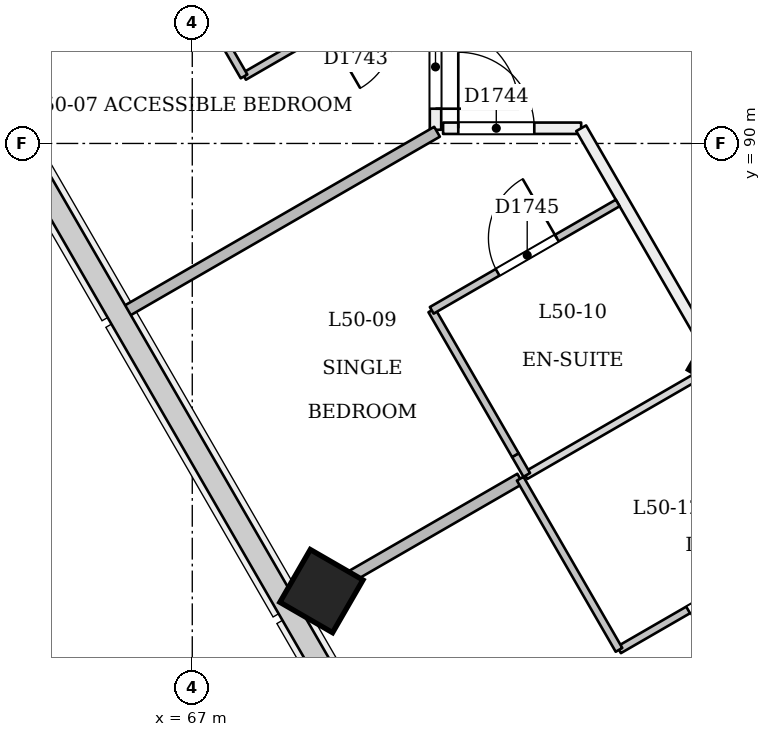
"""IFC4 building model, lengths in metres.
Left out: names, types, materials, properties, quantities, classifications, styles, units other than length and angle.
Written with IfcOpenShell. Run it as: python <this file> out.ifc"""

import sys

from ifc_helpers import new_model, si_unit, direction, frame, frame_2d, origin, origin_2d, place, context, subcontext, project, spatial, rectangle, extrude, element, fill, save


model = new_model("IFC4")
c1 = context("Model", 3, precision=1e-05, world=origin(), true_north=direction((0.0, 1.0)))
c2 = subcontext(c1, "Body", "Model", "MODEL_VIEW")
j1 = project(units=[si_unit("LENGTHUNIT", "METRE"), si_unit("PLANEANGLEUNIT", "RADIAN")], contexts=[c1])
p1 = place(None, origin())
s1 = spatial("IfcSite", under=j1, at=p1, CompositionType="ELEMENT")
p2 = place(p1, origin())
s2 = spatial("IfcBuilding", under=s1, at=p2, CompositionType="ELEMENT")
p3 = place(p2, frame((0.0, 0.0, 194.4)))
s3 = spatial("IfcBuildingStorey", under=s2, at=p3, CompositionType="ELEMENT", Elevation=194.4)
p4 = place(p3, frame((73.912, 87.089, -0.018), z_axis=(0.02215519141, 0.038415882353, 0.999016199807), x_axis=(-0.865361930339, -0.499673644695, 0.03840544644)))
e1 = element("IfcColumn", 1, at=p4, inside=s3, PredefinedType="COLUMN", context=c2, shape_type="SweptSolid", body=[
    extrude(rectangle(XDim=0.6, YDim=0.6, at=origin_2d()), origin(), (0.0, 0.0, 1.0), 3.604),
])
p5 = place(p3, frame((68.673, 84.064, 0.0), z_axis=(0.022235136645, 0.038468150514, 0.999012412383), x_axis=(-0.865845034967, -0.498830353482, 0.038479265431)))
e2 = element("IfcColumn", 2, at=p5, inside=s3, PredefinedType="COLUMN", context=c2, shape_type="SweptSolid", body=[
    extrude(rectangle(XDim=0.8, YDim=0.8, at=origin_2d()), origin(), (0.0, 0.0, 1.0), 3.579),
])
p6 = place(p3, frame((70.2, 93.519, 0.0), z_axis=(0.0, 0.0, 1.0), x_axis=(0.0, -1.0, 0.0)))
e3 = element("IfcWall", 3, at=p6, inside=s3, PredefinedType="PARTITIONING", context=c2, shape_type="SweptSolid", body=[
    extrude(rectangle(XDim=3.339, YDim=0.15, at=frame_2d((1.669, 0.0))), origin(), (0.0, 0.0, 1.0), 3.15),
])
p7 = place(p6, frame((1.962, 0.0, 0.0)))
e4 = element("IfcOpeningElement", 4, at=p7, cuts=e3, PredefinedType="OPENING", context=c2, shape_type="SweptSolid", body=[
    extrude(rectangle(XDim=1.1, YDim=2.1, at=frame_2d((0.55, 1.05))), frame((0.0, 0.085, 0.0), z_axis=(0.0, -1.0, 0.0), x_axis=(1.0, 0.0, 0.0)), (0.0, 0.0, 1.0), 0.171),
])
p8 = place(p3, frame((70.3, 90.2, 0.0), z_axis=(0.0, 0.0, 1.0), x_axis=(1.0, 0.0, 0.0)))
e5 = element("IfcWall", 5, at=p8, inside=s3, PredefinedType="PARTITIONING", context=c2, shape_type="SweptSolid", body=[
    extrude(rectangle(XDim=1.817, YDim=0.15, at=frame_2d((0.908, 0.0))), origin(), (0.0, 0.0, 1.0), 3.15),
])
p9 = place(p8, frame((0.2, 0.0, 0.0)))
e6 = element("IfcOpeningElement", 6, at=p9, cuts=e5, PredefinedType="OPENING", context=c2, shape_type="SweptSolid", body=[
    extrude(rectangle(XDim=1.0, YDim=2.1, at=frame_2d((0.5, 1.05))), frame((0.0, 0.085, 0.0), z_axis=(0.0, -1.0, 0.0), x_axis=(1.0, 0.0, 0.0)), (0.0, 0.0, 1.0), 0.171),
])
p10 = place(p3, frame((72.116, 90.2, 0.0), z_axis=(0.0, 0.0, 1.0), x_axis=(0.500004369671, -0.866022880939, 0.0)))
e7 = element("IfcWall", 7, at=p10, inside=s3, PredefinedType="PARTITIONING", context=c2, shape_type="SweptSolid", body=[
    extrude(rectangle(XDim=25.637, YDim=0.15, at=frame_2d((12.819, 0.0))), origin(), (0.0, 0.0, 1.0), 2.75),
])
p11 = place(p10, frame((6.487, 0.0, 0.0)))
e8 = element("IfcOpeningElement", 8, at=p11, cuts=e7, PredefinedType="OPENING", context=c2, shape_type="SweptSolid", body=[
    extrude(rectangle(XDim=1.0, YDim=2.1, at=frame_2d((0.5, 1.05))), frame((0.0, 0.085, 0.0), z_axis=(0.0, -1.0, 0.0), x_axis=(1.0, 0.0, 0.0)), (0.0, 0.0, 1.0), 0.171),
])
p12 = place(p10, frame((10.992, 0.0, 0.0)))
e9 = element("IfcOpeningElement", 9, at=p12, cuts=e7, PredefinedType="OPENING", context=c2, shape_type="SweptSolid", body=[
    extrude(rectangle(XDim=1.2, YDim=2.1, at=frame_2d((0.6, 1.05))), frame((0.0, 0.085, 0.0), z_axis=(0.0, -1.0, 0.0), x_axis=(1.0, 0.0, 0.0)), (0.0, 0.0, 1.0), 0.171),
])
p13 = place(p10, frame((19.987, 0.0, 0.0)))
e10 = element("IfcOpeningElement", 10, at=p13, cuts=e7, PredefinedType="OPENING", context=c2, shape_type="SweptSolid", body=[
    extrude(rectangle(XDim=1.0, YDim=2.1, at=frame_2d((0.5, 1.05))), frame((0.0, 0.085, 0.0), z_axis=(0.0, -1.0, 0.0), x_axis=(1.0, 0.0, 0.0)), (0.0, 0.0, 1.0), 0.171),
])
p14 = place(p10, frame((23.97, 0.0, 0.0)))
e11 = element("IfcOpeningElement", 11, at=p14, cuts=e7, PredefinedType="OPENING", context=c2, shape_type="SweptSolid", body=[
    extrude(rectangle(XDim=1.2, YDim=2.1, at=frame_2d((0.6, 1.05))), frame((0.0, 0.085, 0.0), z_axis=(0.0, -1.0, 0.0), x_axis=(1.0, 0.0, 0.0)), (0.0, 0.0, 1.0), 0.171),
])
p15 = place(p3, frame((70.1, 92.279, 0.0), z_axis=(0.0, 0.0, 1.0), x_axis=(-0.866040030748, -0.499974664501, 0.0)))
e12 = element("IfcWall", 12, at=p15, inside=s3, PredefinedType="PARTITIONING", context=c2, shape_type="SweptSolid", body=[
    extrude(rectangle(XDim=2.793, YDim=0.1, at=frame_2d((1.396, 0.0))), origin(), (0.0, 0.0, 1.0), 3.15),
])
p16 = place(p15, frame((0.647, 0.0, 0.0)))
e13 = element("IfcOpeningElement", 13, at=p16, cuts=e12, PredefinedType="OPENING", context=c2, shape_type="SweptSolid", body=[
    extrude(rectangle(XDim=0.9, YDim=2.1, at=frame_2d((0.45, 1.05))), frame((0.0, 0.061, 0.0), z_axis=(0.0, -1.0, 0.0), x_axis=(1.0, 0.0, 0.0)), (0.0, 0.0, 1.0), 0.121),
])
p17 = place(p3, frame((67.681, 90.882, 0.0), z_axis=(0.0, 0.0, 1.0), x_axis=(-0.500062241894, 0.865989465428, 0.0)))
e14 = element("IfcWall", 14, at=p17, inside=s3, PredefinedType="PARTITIONING", context=c2, shape_type="SweptSolid", body=[
    extrude(rectangle(XDim=2.55, YDim=0.1, at=frame_2d((1.275, 0.0))), origin(), (0.0, 0.0, 1.0), 3.15),
])
p18 = place(p3, frame((66.102, 87.777, 0.0), z_axis=(0.0, 0.0, 1.0), x_axis=(0.866029116435, 0.499993569446, 0.0)))
e15 = element("IfcWall", 15, at=p18, inside=s3, PredefinedType="PARTITIONING", context=c2, shape_type="SweptSolid", body=[
    extrude(rectangle(XDim=4.755, YDim=0.15, at=frame_2d((2.377, 0.0))), origin(), (0.0, 0.0, 1.0), 2.65),
])
p19 = place(p3, frame((71.401, 85.639, 0.0), z_axis=(0.0, 0.0, 1.0), x_axis=(-0.499464218792, 0.866334516308, 0.0)))
e16 = element("IfcWall", 16, at=p19, inside=s3, PredefinedType="PARTITIONING", context=c2, shape_type="SweptSolid", body=[
    extrude(rectangle(XDim=0.3, YDim=0.1, at=frame_2d((0.15, 0.0))), origin(), (0.0, 0.0, 1.0), 2.75),
])
p20 = place(p3, frame((71.251, 85.899, 0.0), z_axis=(0.0, 0.0, 1.0), x_axis=(-0.50002983664, 0.866008176907, 0.0)))
e17 = element("IfcWall", 17, at=p20, inside=s3, PredefinedType="PARTITIONING", context=c2, shape_type="SweptSolid", body=[
    extrude(rectangle(XDim=2.2, YDim=0.1, at=frame_2d((1.1, 0.0))), origin(), (0.0, 0.0, 1.0), 3.15),
])
p21 = place(p3, frame((70.151, 87.805, 0.0), z_axis=(0.0, 0.0, 1.0), x_axis=(0.866048868473, 0.499959355765, 0.0)))
e18 = element("IfcWall", 18, at=p21, inside=s3, PredefinedType="PARTITIONING", context=c2, shape_type="SweptSolid", body=[
    extrude(rectangle(XDim=2.825, YDim=0.1, at=frame_2d((1.413, 0.0))), origin(), (0.0, 0.0, 1.0), 3.15),
])
p22 = place(p21, frame((1.0, 0.0, 0.0)))
e19 = element("IfcOpeningElement", 19, at=p22, cuts=e18, PredefinedType="OPENING", context=c2, shape_type="SweptSolid", body=[
    extrude(rectangle(XDim=0.9, YDim=2.1, at=frame_2d((0.45, 1.05))), frame((0.0, 0.061, 0.0), z_axis=(0.0, -1.0, 0.0), x_axis=(1.0, 0.0, 0.0)), (0.0, 0.0, 1.0), 0.121),
])
p23 = place(p3, frame((68.37, 83.889, 0.0), z_axis=(0.0, 0.0, 1.0), x_axis=(0.865989465428, 0.500062241894, 0.0)))
e20 = element("IfcWall", 20, at=p23, inside=s3, PredefinedType="PARTITIONING", context=c2, shape_type="SweptSolid", body=[
    extrude(rectangle(XDim=3.4, YDim=0.15, at=frame_2d((1.7, 0.0))), origin(), (0.0, 0.0, 1.0), 2.65),
])
p24 = place(p3, frame((71.383, 85.629, 0.0), z_axis=(0.0, 0.0, 1.0), x_axis=(0.866011243319, 0.500024525844, 0.0)))
e21 = element("IfcWall", 21, at=p24, inside=s3, PredefinedType="PARTITIONING", context=c2, shape_type="SweptSolid", body=[
    extrude(rectangle(XDim=2.845, YDim=0.1, at=frame_2d((1.422, 0.0))), origin(), (0.0, 0.0, 1.0), 2.75),
])
p25 = place(p3, frame((75.147, 84.8, 0.0), z_axis=(0.0, 0.0, 1.0), x_axis=(-0.866046596414, -0.499963291492, 0.0)))
e22 = element("IfcWall", 22, at=p25, inside=s3, PredefinedType="PARTITIONING", context=c2, shape_type="SweptSolid", body=[
    extrude(rectangle(XDim=2.925, YDim=0.1, at=frame_2d((1.462, 0.0))), origin(), (0.0, 0.0, 1.0), 3.15),
])
p26 = place(p25, frame((0.975, 0.0, 0.0)))
e23 = element("IfcOpeningElement", 23, at=p26, cuts=e22, PredefinedType="OPENING", context=c2, shape_type="SweptSolid", body=[
    extrude(rectangle(XDim=0.9, YDim=2.1, at=frame_2d((0.45, 1.05))), frame((0.0, 0.061, 0.0), z_axis=(0.0, -1.0, 0.0), x_axis=(1.0, 0.0, 0.0)), (0.0, 0.0, 1.0), 0.121),
])
p27 = place(p3, frame((72.614, 83.338, 0.0), z_axis=(0.0, 0.0, 1.0), x_axis=(-0.500006934395, 0.866021400173, 0.0)))
e24 = element("IfcWall", 24, at=p27, inside=s3, PredefinedType="PARTITIONING", context=c2, shape_type="SweptSolid", body=[
    extrude(rectangle(XDim=2.6, YDim=0.1, at=frame_2d((1.3, 0.0))), origin(), (0.0, 0.0, 1.0), 2.75),
])
p28 = place(p7, origin())
e25 = element("IfcDoor", 25, at=p28, inside=s3, OperationType="SINGLE_SWING_RIGHT", PredefinedType="NOTDEFINED", context=c2, shape_type="SweptSolid", body=[
    extrude(rectangle(XDim=1.1, YDim=2.1, at=frame_2d((0.55, 1.05))), frame((0.0, 0.025, 0.0), z_axis=(0.0, -1.0, 0.0), x_axis=(1.0, 0.0, 0.0)), (0.0, 0.0, 1.0), 0.05),
])
fill(e4, e25)
p29 = place(p9, origin())
e26 = element("IfcDoor", 26, at=p29, inside=s3, OperationType="SINGLE_SWING_LEFT", PredefinedType="NOTDEFINED", context=c2, shape_type="SweptSolid", body=[
    extrude(rectangle(XDim=1.0, YDim=2.1, at=frame_2d((0.5, 1.05))), frame((0.0, 0.025, 0.0), z_axis=(0.0, -1.0, 0.0), x_axis=(1.0, 0.0, 0.0)), (0.0, 0.0, 1.0), 0.05),
])
fill(e6, e26)
p30 = place(p22, origin())
e27 = element("IfcDoor", 27, at=p30, inside=s3, OperationType="SINGLE_SWING_RIGHT", PredefinedType="NOTDEFINED", context=c2, shape_type="SweptSolid", body=[
    extrude(rectangle(XDim=0.9, YDim=2.1, at=frame_2d((0.45, 1.05))), frame((0.0, 0.025, 0.0), z_axis=(0.0, -1.0, 0.0), x_axis=(1.0, 0.0, 0.0)), (0.0, 0.0, 1.0), 0.05),
])
fill(e19, e27)
p31 = place(p26, origin())
e28 = element("IfcDoor", 28, at=p31, inside=s3, OperationType="SINGLE_SWING_LEFT", PredefinedType="NOTDEFINED", context=c2, shape_type="SweptSolid", body=[
    extrude(rectangle(XDim=0.9, YDim=2.1, at=frame_2d((0.45, 1.05))), frame((0.0, 0.025, 0.0), z_axis=(0.0, -1.0, 0.0), x_axis=(1.0, 0.0, 0.0)), (0.0, 0.0, 1.0), 0.05),
])
fill(e23, e28)
save(model, sys.argv[1])
